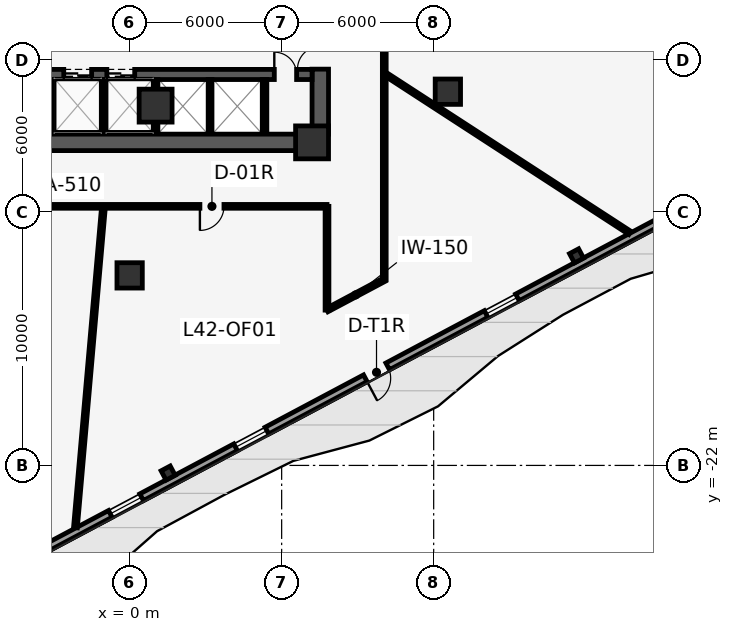
"""IFC4 building model, lengths in metres.
Left out: names, types, materials, properties, quantities, classifications, styles, units other than length and angle.
Written with IfcOpenShell. Run it as: python <this file> out.ifc"""

import sys

from ifc_helpers import new_model, si_unit, direction, frame, frame_2d, origin, origin_2d, place, context, subcontext, project, spatial, rectangle, i_section, extrude, element, fill, save


model = new_model("IFC4")
c1 = context("Model", 3, precision=1e-05, world=origin(), true_north=direction((0.0, 1.0)))
c2 = subcontext(c1, "Body", "Model", "MODEL_VIEW")
j1 = project(units=[si_unit("LENGTHUNIT", "METRE"), si_unit("PLANEANGLEUNIT", "RADIAN")], contexts=[c1])
p1 = place(None, origin())
s1 = spatial("IfcSite", under=j1, at=p1, CompositionType="ELEMENT")
p2 = place(p1, origin())
s2 = spatial("IfcBuilding", under=s1, at=p2, CompositionType="ELEMENT")
p3 = place(p2, frame((0.0, 0.0, 181.9)))
s3 = spatial("IfcBuildingStorey", under=s2, at=p3, CompositionType="ELEMENT", Elevation=181.9)
p4 = place(p3, frame((7.525, -8.925, 0.0), z_axis=(0.0, 0.0, 1.0), x_axis=(0.0, 1.0, 0.0)))
e1 = element("IfcWall", 1, at=p4, inside=s3, PredefinedType="SHEAR", context=c2, shape_type="SweptSolid", body=[
    extrude(rectangle(XDim=9.025, YDim=0.65, at=frame_2d((4.513, 0.0))), origin(), (0.0, 0.0, 1.0), 3.85),
])
p5 = place(p4, frame((2.565, 0.0, 0.0)))
e2 = element("IfcOpeningElement", 2, at=p5, cuts=e1, PredefinedType="OPENING", context=c2, shape_type="SweptSolid", body=[
    extrude(rectangle(XDim=1.8, YDim=2.2, at=frame_2d((0.9, 1.1))), frame((0.0, 0.335, 0.0), z_axis=(0.0, -1.0, 0.0), x_axis=(1.0, 0.0, 0.0)), (0.0, 0.0, 1.0), 0.67),
])
p6 = place(p4, frame((7.475, 0.0, 0.0)))
e3 = element("IfcOpeningElement", 3, at=p6, cuts=e1, PredefinedType="OPENING", context=c2, shape_type="SweptSolid", body=[
    extrude(rectangle(XDim=1.2, YDim=2.15, at=frame_2d((0.6, 1.075))), frame((0.0, 0.335, 0.0), z_axis=(0.0, -1.0, 0.0), x_axis=(1.0, 0.0, 0.0)), (0.0, 0.0, 1.0), 0.67),
])
p7 = place(p3, frame((-7.525, -9.25, 0.0), z_axis=(0.0, 0.0, 1.0), x_axis=(1.0, 0.0, 0.0)))
e4 = element("IfcWall", 4, at=p7, inside=s3, PredefinedType="SHEAR", context=c2, shape_type="SweptSolid", body=[
    extrude(rectangle(XDim=15.05, YDim=0.65, at=frame_2d((7.525, 0.0))), origin(), (0.0, 0.0, 1.0), 3.85),
])
p8 = place(p3, frame((-7.2, -6.57, 0.0), z_axis=(0.0, 0.0, 1.0), x_axis=(1.0, 0.0, 0.0)))
e5 = element("IfcWall", 5, at=p8, inside=s3, PredefinedType="SHEAR", context=c2, shape_type="SweptSolid", body=[
    extrude(rectangle(XDim=14.4, YDim=0.4, at=frame_2d((7.2, 0.0))), origin(), (0.0, 0.0, 1.0), 3.85),
])
p9 = place(p8, frame((0.5, 0.0, 0.0)))
e6 = element("IfcOpeningElement", 6, at=p9, cuts=e5, PredefinedType="OPENING", context=c2, shape_type="SweptSolid", body=[
    extrude(rectangle(XDim=1.1, YDim=2.2, at=frame_2d((0.55, 1.1))), frame((0.0, 0.21, 0.0), z_axis=(0.0, -1.0, 0.0), x_axis=(1.0, 0.0, 0.0)), (0.0, 0.0, 1.0), 0.42),
])
p10 = place(p8, frame((2.55, 0.0, 0.0)))
e7 = element("IfcOpeningElement", 7, at=p10, cuts=e5, PredefinedType="OPENING", context=c2, shape_type="SweptSolid", body=[
    extrude(rectangle(XDim=1.1, YDim=2.2, at=frame_2d((0.55, 1.1))), frame((0.0, 0.21, 0.0), z_axis=(0.0, -1.0, 0.0), x_axis=(1.0, 0.0, 0.0)), (0.0, 0.0, 1.0), 0.42),
])
p11 = place(p8, frame((4.6, 0.0, 0.0)))
e8 = element("IfcOpeningElement", 8, at=p11, cuts=e5, PredefinedType="OPENING", context=c2, shape_type="SweptSolid", body=[
    extrude(rectangle(XDim=1.1, YDim=2.2, at=frame_2d((0.55, 1.1))), frame((0.0, 0.21, 0.0), z_axis=(0.0, -1.0, 0.0), x_axis=(1.0, 0.0, 0.0)), (0.0, 0.0, 1.0), 0.42),
])
p12 = place(p8, frame((6.3, 0.0, 0.0)))
e9 = element("IfcOpeningElement", 9, at=p12, cuts=e5, PredefinedType="OPENING", context=c2, shape_type="SweptSolid", body=[
    extrude(rectangle(XDim=1.1, YDim=2.2, at=frame_2d((0.55, 1.1))), frame((0.0, 0.21, 0.0), z_axis=(0.0, -1.0, 0.0), x_axis=(1.0, 0.0, 0.0)), (0.0, 0.0, 1.0), 0.42),
])
p13 = place(p8, frame((12.91, 0.0, 0.0)))
e10 = element("IfcOpeningElement", 10, at=p13, cuts=e5, PredefinedType="OPENING", context=c2, shape_type="SweptSolid", body=[
    extrude(rectangle(XDim=0.88, YDim=2.15, at=frame_2d((0.44, 1.075))), frame((0.0, 0.21, 0.0), z_axis=(0.0, -1.0, 0.0), x_axis=(1.0, 0.0, 0.0)), (0.0, 0.0, 1.0), 0.42),
])
for number, where, z_axis, x_axis in (
    (11, (7.2, -9.25, 0.0), (0.0, 0.0, 1.0), (1.0, 0.0, 0.0)),
    (12, (1.025, -7.8, 0.0), (0.0, 0.0, 1.0), (1.0, 0.0, 0.0)),
):
    element("IfcColumn", number, at=place(p3, frame(where, z_axis=z_axis, x_axis=x_axis)), inside=s3, PredefinedType="COLUMN", context=c2, shape_type="SweptSolid", body=[
        extrude(rectangle(XDim=1.3, YDim=1.3, at=origin_2d()), origin(), (0.0, 0.0, 1.0), 4.1),
    ])
for number, where, z_axis, x_axis in (
    (13, (12.56, -7.25, 0.0), (0.0, 0.0, 1.0), (1.0, 0.0, 0.0)),
    (14, (0.0, -14.5, 0.0), (0.0, 0.0, 1.0), (1.0, 0.0, 0.0)),
):
    element("IfcColumn", number, at=place(p3, frame(where, z_axis=z_axis, x_axis=x_axis)), inside=s3, PredefinedType="COLUMN", context=c2, shape_type="SweptSolid", body=[
        extrude(rectangle(XDim=1.0, YDim=1.0, at=origin_2d()), origin(), (0.0, 0.0, 1.0), 4.1),
    ])
for number, where, z_axis, x_axis in (
    (15, (1.52, -22.302, 0.0), (0.0, 0.0, 1.0), (0.883, 0.469, 0.0)),
    (16, (17.639, -13.731, 0.0), (0.0, 0.0, 1.0), (0.883, 0.469, 0.0)),
):
    element("IfcColumn", number, at=place(p3, frame(where, z_axis=z_axis, x_axis=x_axis)), inside=s3, PredefinedType="COLUMN", context=c2, shape_type="SweptSolid", body=[
        extrude(i_section(OverallWidth=0.406, OverallDepth=0.417, WebThickness=0.03, FlangeThickness=0.048, at=origin_2d()), origin(), (0.0, 0.0, 1.0), 4.1),
    ])
p14 = place(p3, frame((34.398, -5.217, 0.0), z_axis=(0.0, 0.0, 1.0), x_axis=(-0.88294811928, -0.469470572731, 0.0)))
e17 = element("IfcWall", 17, at=p14, inside=s3, PredefinedType="STANDARD", context=c2, shape_type="SweptSolid", body=[
    extrude(rectangle(XDim=55.845, YDim=0.3, at=frame_2d((27.923, 0.0))), origin(), (0.0, 0.0, 1.0), 3.85),
])
p15 = place(p14, frame((27.423, 0.0, 0.0)))
e18 = element("IfcOpeningElement", 18, at=p15, cuts=e17, PredefinedType="OPENING", context=c2, shape_type="SweptSolid", body=[
    extrude(rectangle(XDim=1.0, YDim=2.15, at=frame_2d((0.5, 1.075))), frame((0.0, 0.16, 0.0), z_axis=(0.0, -1.0, 0.0), x_axis=(1.0, 0.0, 0.0)), (0.0, 0.0, 1.0), 0.32),
])
p16 = place(p14, frame((4.823, 0.0, 0.85)))
e19 = element("IfcOpeningElement", 19, at=p16, cuts=e17, PredefinedType="OPENING", context=c2, shape_type="SweptSolid", body=[
    extrude(rectangle(XDim=1.4, YDim=2.2, at=frame_2d((0.7, 1.1))), frame((0.0, 0.16, 0.0), z_axis=(0.0, -1.0, 0.0), x_axis=(1.0, 0.0, 0.0)), (0.0, 0.0, 1.0), 0.32),
])
p17 = place(p14, frame((10.423, 0.0, 0.85)))
e20 = element("IfcOpeningElement", 20, at=p17, cuts=e17, PredefinedType="OPENING", context=c2, shape_type="SweptSolid", body=[
    extrude(rectangle(XDim=1.4, YDim=2.2, at=frame_2d((0.7, 1.1))), frame((0.0, 0.16, 0.0), z_axis=(0.0, -1.0, 0.0), x_axis=(1.0, 0.0, 0.0)), (0.0, 0.0, 1.0), 0.32),
])
p18 = place(p14, frame((21.623, 0.0, 0.85)))
e21 = element("IfcOpeningElement", 21, at=p18, cuts=e17, PredefinedType="OPENING", context=c2, shape_type="SweptSolid", body=[
    extrude(rectangle(XDim=1.4, YDim=2.2, at=frame_2d((0.7, 1.1))), frame((0.0, 0.16, 0.0), z_axis=(0.0, -1.0, 0.0), x_axis=(1.0, 0.0, 0.0)), (0.0, 0.0, 1.0), 0.32),
])
p19 = place(p14, frame((32.823, 0.0, 0.85)))
e22 = element("IfcOpeningElement", 22, at=p19, cuts=e17, PredefinedType="OPENING", context=c2, shape_type="SweptSolid", body=[
    extrude(rectangle(XDim=1.4, YDim=2.2, at=frame_2d((0.7, 1.1))), frame((0.0, 0.16, 0.0), z_axis=(0.0, -1.0, 0.0), x_axis=(1.0, 0.0, 0.0)), (0.0, 0.0, 1.0), 0.32),
])
p20 = place(p14, frame((38.423, 0.0, 0.85)))
e23 = element("IfcOpeningElement", 23, at=p20, cuts=e17, PredefinedType="OPENING", context=c2, shape_type="SweptSolid", body=[
    extrude(rectangle(XDim=1.4, YDim=2.2, at=frame_2d((0.7, 1.1))), frame((0.0, 0.16, 0.0), z_axis=(0.0, -1.0, 0.0), x_axis=(1.0, 0.0, 0.0)), (0.0, 0.0, 1.0), 0.32),
])
p21 = place(p14, frame((44.023, 0.0, 0.85)))
e24 = element("IfcOpeningElement", 24, at=p21, cuts=e17, PredefinedType="OPENING", context=c2, shape_type="SweptSolid", body=[
    extrude(rectangle(XDim=1.4, YDim=2.2, at=frame_2d((0.7, 1.1))), frame((0.0, 0.16, 0.0), z_axis=(0.0, -1.0, 0.0), x_axis=(1.0, 0.0, 0.0)), (0.0, 0.0, 1.0), 0.32),
])
p22 = place(p14, frame((49.623, 0.0, 0.85)))
e25 = element("IfcOpeningElement", 25, at=p22, cuts=e17, PredefinedType="OPENING", context=c2, shape_type="SweptSolid", body=[
    extrude(rectangle(XDim=1.4, YDim=2.2, at=frame_2d((0.7, 1.1))), frame((0.0, 0.16, 0.0), z_axis=(0.0, -1.0, 0.0), x_axis=(1.0, 0.0, 0.0)), (0.0, 0.0, 1.0), 0.32),
])
for number, where, z_axis, x_axis in (
    (26, (-3.075, -8.85, 0.0), (0.0, 0.0, 1.0), (0.0, 1.0, 0.0)),
    (27, (-1.025, -8.85, 0.0), (0.0, 0.0, 1.0), (0.0, 1.0, 0.0)),
):
    element("IfcWall", number, at=place(p3, frame(where, z_axis=z_axis, x_axis=x_axis)), inside=s3, PredefinedType="PARTITIONING", context=c2, shape_type="SweptSolid", body=[
        extrude(rectangle(XDim=2.08, YDim=0.15, at=frame_2d((1.04, 0.0))), origin(), (0.0, 0.0, 1.0), 3.85),
    ])
p23 = place(p3, frame((1.025, -8.85, 0.0), z_axis=(0.0, 0.0, 1.0), x_axis=(0.0, 1.0, 0.0)))
e28 = element("IfcWall", 28, at=p23, inside=s3, PredefinedType="PARTITIONING", context=c2, shape_type="SweptSolid", body=[
    extrude(rectangle(XDim=2.08, YDim=0.18, at=frame_2d((1.04, 0.0))), origin(), (0.0, 0.0, 1.0), 2.898),
])
p24 = place(p3, frame((3.175, -8.85, 0.0), z_axis=(0.0, 0.0, 1.0), x_axis=(0.0, 1.0, 0.0)))
e29 = element("IfcWall", 29, at=p24, inside=s3, PredefinedType="PARTITIONING", context=c2, shape_type="SweptSolid", body=[
    extrude(rectangle(XDim=2.08, YDim=0.15, at=frame_2d((1.04, 0.0))), origin(), (0.0, 0.0, 1.0), 3.85),
])
p25 = place(p3, frame((5.325, -8.85, 0.0), z_axis=(0.0, 0.0, 1.0), x_axis=(0.0, 1.0, 0.0)))
e30 = element("IfcWall", 30, at=p25, inside=s3, PredefinedType="PARTITIONING", context=c2, shape_type="SweptSolid", body=[
    extrude(rectangle(XDim=2.08, YDim=0.18, at=frame_2d((1.04, 0.0))), origin(), (0.0, 0.0, 1.0), 3.85),
])
p26 = place(p3, frame((10.05, -14.669, 0.0), z_axis=(0.0, 0.0, 1.0), x_axis=(-0.88294894539, -0.469469019035, 0.0)))
e31 = element("IfcWall", 31, at=p26, inside=s3, PredefinedType="PARTITIONING", context=c2, shape_type="SweptSolid", body=[
    extrude(rectangle(XDim=2.56, YDim=0.15, at=frame_2d((1.28, 0.0))), origin(), (0.0, 0.0, 1.0), 3.85),
])
p27 = place(p3, frame((7.79, -15.871, 0.0), z_axis=(0.0, 0.0, 1.0), x_axis=(0.0, 1.0, 0.0)))
e32 = element("IfcWall", 32, at=p27, inside=s3, PredefinedType="PARTITIONING", context=c2, shape_type="SweptSolid", body=[
    extrude(rectangle(XDim=4.096, YDim=0.15, at=frame_2d((2.048, 0.0))), origin(), (0.0, 0.0, 1.0), 3.85),
])
p28 = place(p3, frame((7.79, -11.775, 0.0), z_axis=(0.0, 0.0, 1.0), x_axis=(-1.0, 0.0, 0.0)))
e33 = element("IfcWall", 33, at=p28, inside=s3, PredefinedType="PARTITIONING", context=c2, shape_type="SweptSolid", body=[
    extrude(rectangle(XDim=15.58, YDim=0.15, at=frame_2d((7.79, 0.0))), origin(), (0.0, 0.0, 1.0), 3.85),
])
p29 = place(p28, frame((4.067, 0.0, 0.0)))
e34 = element("IfcOpeningElement", 34, at=p29, cuts=e33, PredefinedType="OPENING", context=c2, shape_type="SweptSolid", body=[
    extrude(rectangle(XDim=0.95, YDim=2.15, at=frame_2d((0.475, 1.075))), frame((0.0, 0.085, 0.0), z_axis=(0.0, -1.0, 0.0), x_axis=(1.0, 0.0, 0.0)), (0.0, 0.0, 1.0), 0.17),
])
p30 = place(p3, frame((10.05, -2.13, 0.0), z_axis=(0.0, 0.0, 1.0), x_axis=(0.0, -1.0, 0.0)))
e35 = element("IfcWall", 35, at=p30, inside=s3, PredefinedType="PARTITIONING", context=c2, shape_type="SweptSolid", body=[
    extrude(rectangle(XDim=12.539, YDim=0.15, at=frame_2d((6.27, 0.0))), origin(), (0.0, 0.0, 1.0), 3.85),
])
p31 = place(p3, frame((-1.039, -11.88, 0.0), z_axis=(0.0, 0.0, 1.0), x_axis=(-0.087151118592, -0.996195102642, 0.0)))
e36 = element("IfcWall", 36, at=p31, inside=s3, PredefinedType="PARTITIONING", context=c2, shape_type="SweptSolid", body=[
    extrude(rectangle(XDim=12.626, YDim=0.15, at=frame_2d((6.313, 0.0))), origin(), (0.0, 0.0, 1.0), 3.85),
])
p32 = place(p3, frame((10.155, -6.595, 0.0), z_axis=(0.0, 0.0, 1.0), x_axis=(0.838665527381, -0.544646796725, 0.0)))
e37 = element("IfcWall", 37, at=p32, inside=s3, PredefinedType="PARTITIONING", context=c2, shape_type="SweptSolid", body=[
    extrude(rectangle(XDim=11.433, YDim=0.15, at=frame_2d((5.717, 0.0))), origin(), (0.0, 0.0, 1.0), 3.85),
])
p33 = place(p15, origin())
e38 = element("IfcDoor", 38, at=p33, inside=s3, OperationType="SINGLE_SWING_RIGHT", PredefinedType="DOOR", context=c2, shape_type="SweptSolid", body=[
    extrude(rectangle(XDim=1.0, YDim=2.15, at=frame_2d((0.5, 1.075))), frame((0.0, 0.025, 0.0), z_axis=(0.0, -1.0, 0.0), x_axis=(1.0, 0.0, 0.0)), (0.0, 0.0, 1.0), 0.05),
])
fill(e18, e38)
p34 = place(p18, origin())
e39 = element("IfcWindow", 39, at=p34, inside=s3, PartitioningType="SINGLE_PANEL", PredefinedType="WINDOW", context=c2, shape_type="SweptSolid", body=[
    extrude(rectangle(XDim=1.4, YDim=2.2, at=frame_2d((0.7, 1.1))), frame((0.0, 0.03, 0.0), z_axis=(0.0, -1.0, 0.0), x_axis=(1.0, 0.0, 0.0)), (0.0, 0.0, 1.0), 0.06),
])
fill(e21, e39)
p35 = place(p19, origin())
e40 = element("IfcWindow", 40, at=p35, inside=s3, PartitioningType="SINGLE_PANEL", PredefinedType="WINDOW", context=c2, shape_type="SweptSolid", body=[
    extrude(rectangle(XDim=1.4, YDim=2.2, at=frame_2d((0.7, 1.1))), frame((0.0, 0.03, 0.0), z_axis=(0.0, -1.0, 0.0), x_axis=(1.0, 0.0, 0.0)), (0.0, 0.0, 1.0), 0.06),
])
fill(e22, e40)
p36 = place(p20, origin())
e41 = element("IfcWindow", 41, at=p36, inside=s3, PartitioningType="SINGLE_PANEL", PredefinedType="WINDOW", context=c2, shape_type="SweptSolid", body=[
    extrude(rectangle(XDim=1.4, YDim=2.2, at=frame_2d((0.7, 1.1))), frame((0.0, 0.03, 0.0), z_axis=(0.0, -1.0, 0.0), x_axis=(1.0, 0.0, 0.0)), (0.0, 0.0, 1.0), 0.06),
])
fill(e23, e41)
p37 = place(p11, origin())
e42 = element("IfcDoor", 42, at=p37, inside=s3, OperationType="DOUBLE_DOOR_SLIDING", PredefinedType="DOOR", context=c2, shape_type="SweptSolid", body=[
    extrude(rectangle(XDim=1.1, YDim=2.2, at=frame_2d((0.55, 1.1))), frame((0.0, 0.025, 0.0), z_axis=(0.0, -1.0, 0.0), x_axis=(1.0, 0.0, 0.0)), (0.0, 0.0, 1.0), 0.05),
])
fill(e8, e42)
p38 = place(p12, origin())
e43 = element("IfcDoor", 43, at=p38, inside=s3, OperationType="DOUBLE_DOOR_SLIDING", PredefinedType="DOOR", context=c2, shape_type="SweptSolid", body=[
    extrude(rectangle(XDim=1.1, YDim=2.2, at=frame_2d((0.55, 1.1))), frame((0.0, 0.025, 0.0), z_axis=(0.0, -1.0, 0.0), x_axis=(1.0, 0.0, 0.0)), (0.0, 0.0, 1.0), 0.05),
])
fill(e9, e43)
p39 = place(p5, origin())
e44 = element("IfcDoor", 44, at=p39, inside=s3, OperationType="DOUBLE_DOOR_SINGLE_SWING", PredefinedType="DOOR", context=c2, shape_type="SweptSolid", body=[
    extrude(rectangle(XDim=1.8, YDim=2.2, at=frame_2d((0.9, 1.1))), frame((0.0, 0.025, 0.0), z_axis=(0.0, -1.0, 0.0), x_axis=(1.0, 0.0, 0.0)), (0.0, 0.0, 1.0), 0.05),
])
fill(e2, e44)
p40 = place(p13, origin())
e45 = element("IfcDoor", 45, at=p40, inside=s3, OperationType="SINGLE_SWING_LEFT", PredefinedType="DOOR", context=c2, shape_type="SweptSolid", body=[
    extrude(rectangle(XDim=0.88, YDim=2.15, at=frame_2d((0.44, 1.075))), frame((0.0, 0.025, 0.0), z_axis=(0.0, -1.0, 0.0), x_axis=(1.0, 0.0, 0.0)), (0.0, 0.0, 1.0), 0.05),
])
fill(e10, e45)
p41 = place(p29, origin())
e46 = element("IfcDoor", 46, at=p41, inside=s3, OperationType="SINGLE_SWING_RIGHT", PredefinedType="DOOR", context=c2, shape_type="SweptSolid", body=[
    extrude(rectangle(XDim=0.95, YDim=2.15, at=frame_2d((0.475, 1.075))), frame((0.0, 0.025, 0.0), z_axis=(0.0, -1.0, 0.0), x_axis=(1.0, 0.0, 0.0)), (0.0, 0.0, 1.0), 0.05),
])
fill(e34, e46)
save(model, sys.argv[1])
